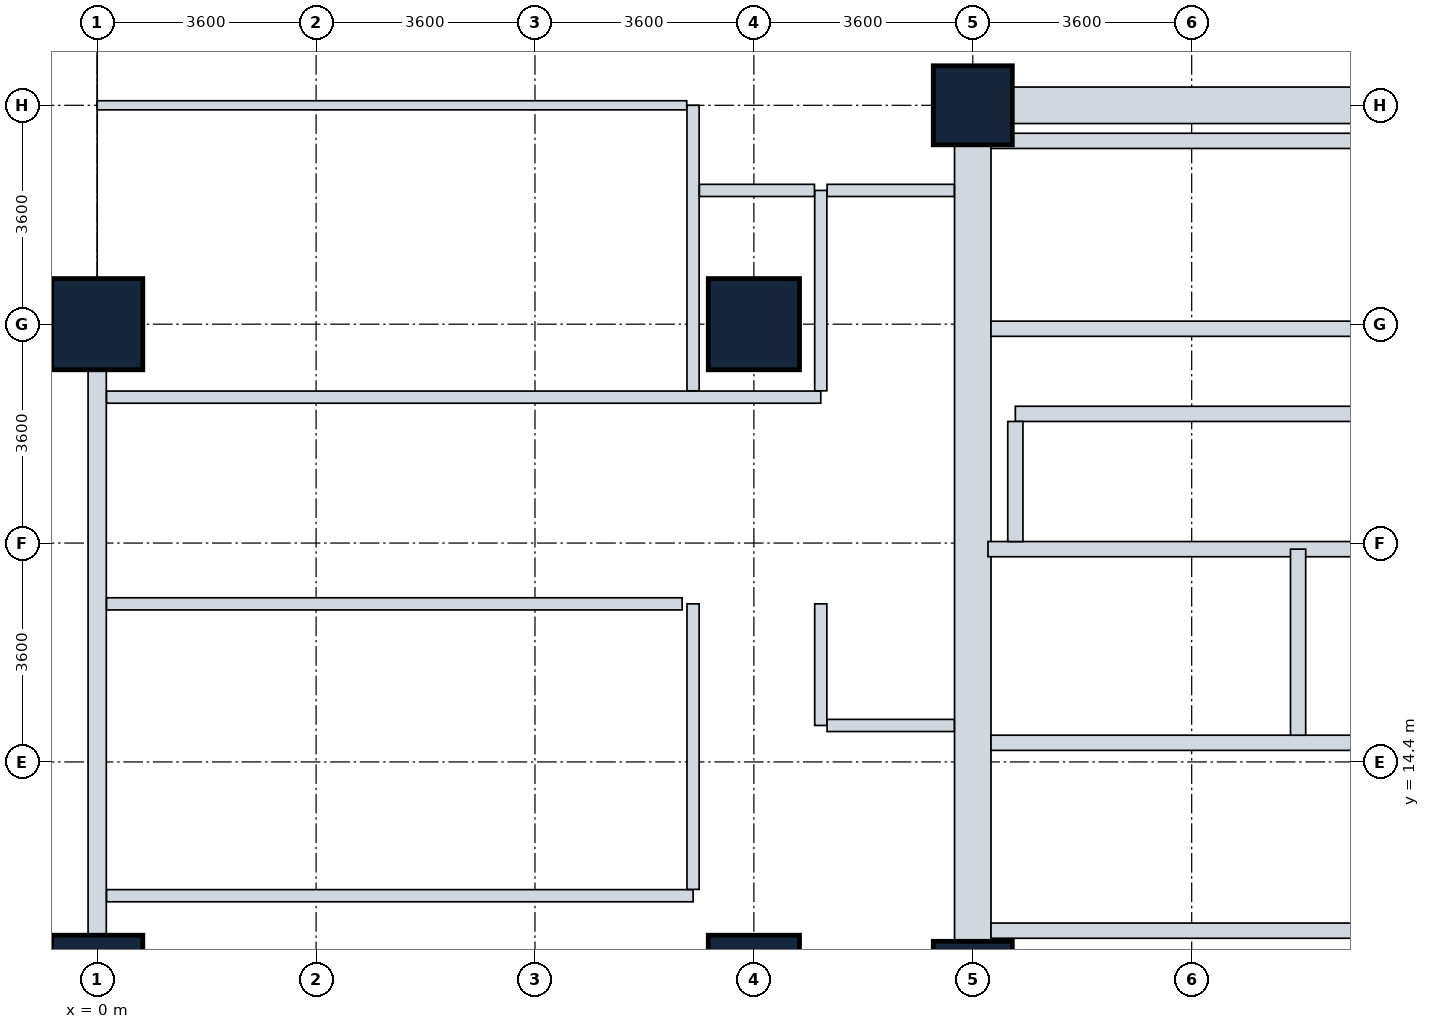
"""IFC4 building model, lengths in metres.
Left out: names, types, materials, properties, quantities, classifications, styles, units other than length and angle.
Written with IfcOpenShell. Run it as: python <this file> out.ifc"""

import sys

from ifc_helpers import new_model, si_unit, direction, frame, frame_2d, origin, origin_2d, place, context, subcontext, project, spatial, rectangle, extrude, element, fill, save


model = new_model("IFC4")
c1 = context("Model", 3, precision=1e-05, world=origin(), true_north=direction((0.0, 1.0)))
c2 = subcontext(c1, "Body", "Model", "MODEL_VIEW")
j1 = project(units=[si_unit("LENGTHUNIT", "METRE"), si_unit("PLANEANGLEUNIT", "RADIAN")], contexts=[c1])
p1 = place(None, origin())
s1 = spatial("IfcSite", under=j1, at=p1, CompositionType="ELEMENT")
p2 = place(p1, origin())
s2 = spatial("IfcBuilding", under=s1, at=p2, CompositionType="ELEMENT")
p3 = place(p2, origin())
s3 = spatial("IfcBuildingStorey", under=s2, at=p3, CompositionType="ELEMENT", Elevation=0.0)
for number, where, z_axis, x_axis in (
    (1, (0.0, 10.8, 0.0), (0.0, 0.0, 1.0), (1.0, 0.0, 0.0)),
    (2, (0.0, 21.6, 0.0), (0.0, 0.0, 1.0), (1.0, 0.0, 0.0)),
    (3, (10.8, 10.8, 0.0), (0.0, 0.0, 1.0), (1.0, 0.0, 0.0)),
    (4, (10.8, 21.6, 0.0), (0.0, 0.0, 1.0), (1.0, 0.0, 0.0)),
):
    element("IfcColumn", number, at=place(p3, frame(where, z_axis=z_axis, x_axis=x_axis)), inside=s3, PredefinedType="COLUMN", context=c2, shape_type="SweptSolid", body=[
        extrude(rectangle(XDim=1.5, YDim=1.5, at=origin_2d()), origin(), (0.0, 0.0, 1.0), 5.4),
    ])
for number, where, z_axis, x_axis in (
    (5, (14.4, 10.8, 0.0), (0.0, 0.0, 1.0), (1.0, 0.0, 0.0)),
    (6, (14.4, 25.2, 0.0), (0.0, 0.0, 1.0), (1.0, 0.0, 0.0)),
):
    element("IfcColumn", number, at=place(p3, frame(where, z_axis=z_axis, x_axis=x_axis)), inside=s3, PredefinedType="COLUMN", context=c2, shape_type="SweptSolid", body=[
        extrude(rectangle(XDim=1.3, YDim=1.3, at=origin_2d()), origin(), (0.0, 0.0, 1.0), 5.4),
    ])
p4 = place(p3, frame((0.0, 0.0, 0.0), z_axis=(0.0, 0.0, 1.0), x_axis=(0.0, 1.0, 0.0)))
e7 = element("IfcWall", 7, at=p4, inside=s3, PredefinedType="STANDARD", context=c2, shape_type="SweptSolid", body=[
    extrude(rectangle(XDim=21.6, YDim=0.3, at=frame_2d((10.8, 0.0))), origin(), (0.0, 0.0, 1.0), 4.43),
])
p5 = place(p4, frame((4.5, 0.0, 0.0)))
e8 = element("IfcOpeningElement", 8, at=p5, cuts=e7, PredefinedType="OPENING", context=c2, shape_type="SweptSolid", body=[
    extrude(rectangle(XDim=1.8, YDim=2.2, at=frame_2d((0.9, 1.1))), frame((0.0, 0.16, 0.0), z_axis=(0.0, -1.0, 0.0), x_axis=(1.0, 0.0, 0.0)), (0.0, 0.0, 1.0), 0.32),
])
p6 = place(p4, frame((13.6, 0.0, 0.0)))
e9 = element("IfcOpeningElement", 9, at=p6, cuts=e7, PredefinedType="OPENING", context=c2, shape_type="SweptSolid", body=[
    extrude(rectangle(XDim=1.1, YDim=2.2, at=frame_2d((0.55, 1.1))), frame((0.0, 0.16, 0.0), z_axis=(0.0, -1.0, 0.0), x_axis=(1.0, 0.0, 0.0)), (0.0, 0.0, 1.0), 0.32),
])
p7 = place(p4, frame((17.8, 0.0, 0.0)))
e10 = element("IfcOpeningElement", 10, at=p7, cuts=e7, PredefinedType="OPENING", context=c2, shape_type="SweptSolid", body=[
    extrude(rectangle(XDim=1.8, YDim=2.2, at=frame_2d((0.9, 1.1))), frame((0.0, 0.16, 0.0), z_axis=(0.0, -1.0, 0.0), x_axis=(1.0, 0.0, 0.0)), (0.0, 0.0, 1.0), 0.32),
])
p8 = place(p3, frame((14.4, 25.2, 0.0), z_axis=(0.0, 0.0, 1.0), x_axis=(1.0, 0.0, 0.0)))
e11 = element("IfcWall", 11, at=p8, inside=s3, PredefinedType="SHEAR", context=c2, shape_type="SweptSolid", body=[
    extrude(rectangle(XDim=18.0, YDim=0.6, at=frame_2d((9.0, 0.0))), origin(), (0.0, 0.0, 1.0), 5.1),
])
p9 = place(p3, frame((14.4, 10.8, 0.0), z_axis=(0.0, 0.0, 1.0), x_axis=(0.0, 1.0, 0.0)))
e12 = element("IfcWall", 12, at=p9, inside=s3, PredefinedType="SHEAR", context=c2, shape_type="SweptSolid", body=[
    extrude(rectangle(XDim=14.4, YDim=0.6, at=frame_2d((7.2, 0.0))), origin(), (0.0, 0.0, 1.0), 5.1),
])
p10 = place(p9, frame((11.05, 0.0, 0.0)))
e13 = element("IfcOpeningElement", 13, at=p10, cuts=e12, PredefinedType="OPENING", context=c2, shape_type="SweptSolid", body=[
    extrude(rectangle(XDim=1.1, YDim=2.1, at=frame_2d((0.55, 1.05))), frame((0.0, 0.31, 0.0), z_axis=(0.0, -1.0, 0.0), x_axis=(1.0, 0.0, 0.0)), (0.0, 0.0, 1.0), 0.62),
])
p11 = place(p9, frame((4.9, 0.0, 0.0)))
e14 = element("IfcOpeningElement", 14, at=p11, cuts=e12, PredefinedType="OPENING", context=c2, shape_type="SweptSolid", body=[
    extrude(rectangle(XDim=1.2, YDim=2.1, at=frame_2d((0.6, 1.05))), frame((0.0, 0.31, 0.0), z_axis=(0.0, -1.0, 0.0), x_axis=(1.0, 0.0, 0.0)), (0.0, 0.0, 1.0), 0.62),
])
p12 = place(p3, frame((14.7, 11.625, 0.0), z_axis=(0.0, 0.0, 1.0), x_axis=(1.0, 0.0, 0.0)))
e15 = element("IfcWall", 15, at=p12, inside=s3, PredefinedType="SHEAR", context=c2, shape_type="SweptSolid", body=[
    extrude(rectangle(XDim=8.65, YDim=0.25, at=frame_2d((4.325, 0.0))), origin(), (0.0, 0.0, 1.0), 5.1),
])
p13 = place(p3, frame((14.7, 14.715, 0.0), z_axis=(0.0, 0.0, 1.0), x_axis=(1.0, 0.0, 0.0)))
e16 = element("IfcWall", 16, at=p13, inside=s3, PredefinedType="SHEAR", context=c2, shape_type="SweptSolid", body=[
    extrude(rectangle(XDim=8.65, YDim=0.25, at=frame_2d((4.325, 0.0))), origin(), (0.0, 0.0, 1.0), 5.1),
])
p14 = place(p13, frame((0.655, 0.0, 0.0)))
e17 = element("IfcOpeningElement", 17, at=p14, cuts=e16, PredefinedType="OPENING", context=c2, shape_type="SweptSolid", body=[
    extrude(rectangle(XDim=1.1, YDim=2.1, at=frame_2d((0.55, 1.05))), frame((0.0, 0.135, 0.0), z_axis=(0.0, -1.0, 0.0), x_axis=(1.0, 0.0, 0.0)), (0.0, 0.0, 1.0), 0.27),
])
for number, where, z_axis, x_axis in (
    (18, (14.7, 21.525, 0.0), (0.0, 0.0, 1.0), (1.0, 0.0, 0.0)),
    (19, (14.7, 24.615, 0.0), (0.0, 0.0, 1.0), (1.0, 0.0, 0.0)),
):
    element("IfcWall", number, at=place(p3, frame(where, z_axis=z_axis, x_axis=x_axis)), inside=s3, PredefinedType="SHEAR", context=c2, shape_type="SweptSolid", body=[
        extrude(rectangle(XDim=8.2, YDim=0.25, at=frame_2d((4.1, 0.0))), origin(), (0.0, 0.0, 1.0), 5.1),
    ])
p15 = place(p3, frame((14.65, 17.9, 0.0), z_axis=(0.0, 0.0, 1.0), x_axis=(1.0, 0.0, 0.0)))
e20 = element("IfcWall", 20, at=p15, inside=s3, PredefinedType="PARTITIONING", context=c2, shape_type="SweptSolid", body=[
    extrude(rectangle(XDim=7.15, YDim=0.25, at=frame_2d((3.575, 0.0))), origin(), (0.0, 0.0, 1.0), 5.085),
])
p16 = place(p3, frame((19.75, 14.84, 0.0), z_axis=(0.0, 0.0, 1.0), x_axis=(0.0, 1.0, 0.0)))
e21 = element("IfcWall", 21, at=p16, inside=s3, PredefinedType="PARTITIONING", context=c2, shape_type="SweptSolid", body=[
    extrude(rectangle(XDim=3.06, YDim=0.25, at=frame_2d((1.53, 0.0))), origin(), (0.0, 0.0, 1.0), 5.085),
])
p17 = place(p16, frame((0.98, 0.0, 0.0)))
e22 = element("IfcOpeningElement", 22, at=p17, cuts=e21, PredefinedType="OPENING", context=c2, shape_type="SweptSolid", body=[
    extrude(rectangle(XDim=1.1, YDim=2.1, at=frame_2d((0.55, 1.05))), frame((0.0, 0.135, 0.0), z_axis=(0.0, -1.0, 0.0), x_axis=(1.0, 0.0, 0.0)), (0.0, 0.0, 1.0), 0.27),
])
p18 = place(p3, frame((15.1, 20.125, 0.0), z_axis=(0.0, 0.0, 1.0), x_axis=(1.0, 0.0, 0.0)))
e23 = element("IfcWall", 23, at=p18, inside=s3, PredefinedType="PARTITIONING", context=c2, shape_type="SweptSolid", body=[
    extrude(rectangle(XDim=7.55, YDim=0.25, at=frame_2d((3.775, 0.0))), origin(), (0.0, 0.0, 1.0), 5.085),
])
p19 = place(p18, frame((0.45, 0.0, 0.0)))
e24 = element("IfcOpeningElement", 24, at=p19, cuts=e23, PredefinedType="OPENING", context=c2, shape_type="SweptSolid", body=[
    extrude(rectangle(XDim=1.1, YDim=2.1, at=frame_2d((0.55, 1.05))), frame((0.0, 0.135, 0.0), z_axis=(0.0, -1.0, 0.0), x_axis=(1.0, 0.0, 0.0)), (0.0, 0.0, 1.0), 0.27),
])
p20 = place(p18, frame((2.3, 0.0, 0.0)))
e25 = element("IfcOpeningElement", 25, at=p20, cuts=e23, PredefinedType="OPENING", context=c2, shape_type="SweptSolid", body=[
    extrude(rectangle(XDim=1.1, YDim=2.1, at=frame_2d((0.55, 1.05))), frame((0.0, 0.135, 0.0), z_axis=(0.0, -1.0, 0.0), x_axis=(1.0, 0.0, 0.0)), (0.0, 0.0, 1.0), 0.27),
])
p21 = place(p18, frame((4.15, 0.0, 0.0)))
e26 = element("IfcOpeningElement", 26, at=p21, cuts=e23, PredefinedType="OPENING", context=c2, shape_type="SweptSolid", body=[
    extrude(rectangle(XDim=1.1, YDim=2.1, at=frame_2d((0.55, 1.05))), frame((0.0, 0.135, 0.0), z_axis=(0.0, -1.0, 0.0), x_axis=(1.0, 0.0, 0.0)), (0.0, 0.0, 1.0), 0.27),
])
p22 = place(p18, frame((6.0, 0.0, 0.0)))
e27 = element("IfcOpeningElement", 27, at=p22, cuts=e23, PredefinedType="OPENING", context=c2, shape_type="SweptSolid", body=[
    extrude(rectangle(XDim=1.1, YDim=2.1, at=frame_2d((0.55, 1.05))), frame((0.0, 0.135, 0.0), z_axis=(0.0, -1.0, 0.0), x_axis=(1.0, 0.0, 0.0)), (0.0, 0.0, 1.0), 0.27),
])
p23 = place(p3, frame((15.1, 18.025, 0.0), z_axis=(0.0, 0.0, 1.0), x_axis=(0.0, 1.0, 0.0)))
e28 = element("IfcWall", 28, at=p23, inside=s3, PredefinedType="PARTITIONING", context=c2, shape_type="SweptSolid", body=[
    extrude(rectangle(XDim=1.975, YDim=0.25, at=frame_2d((0.988, 0.0))), origin(), (0.0, 0.0, 1.0), 5.085),
])
p24 = place(p3, frame((0.154, 12.2, 0.0), z_axis=(0.0, 0.0, 1.0), x_axis=(1.0, 0.0, 0.0)))
e29 = element("IfcWall", 29, at=p24, inside=s3, PredefinedType="PARTITIONING", context=c2, shape_type="SweptSolid", body=[
    extrude(rectangle(XDim=9.646, YDim=0.2, at=frame_2d((4.823, 0.0))), origin(), (0.0, 0.0, 1.0), 4.63),
])
p25 = place(p24, frame((4.186, 0.0, 0.0)))
e30 = element("IfcOpeningElement", 30, at=p25, cuts=e29, PredefinedType="OPENING", context=c2, shape_type="SweptSolid", body=[
    extrude(rectangle(XDim=1.2, YDim=2.1, at=frame_2d((0.6, 1.05))), frame((0.0, 0.11, 0.0), z_axis=(0.0, -1.0, 0.0), x_axis=(1.0, 0.0, 0.0)), (0.0, 0.0, 1.0), 0.22),
])
p26 = place(p3, frame((9.8, 12.304, 0.0), z_axis=(0.0, 0.0, 1.0), x_axis=(0.0, 1.0, 0.0)))
e31 = element("IfcWall", 31, at=p26, inside=s3, PredefinedType="PARTITIONING", context=c2, shape_type="SweptSolid", body=[
    extrude(rectangle(XDim=4.696, YDim=0.2, at=frame_2d((2.348, 0.0))), origin(), (0.0, 0.0, 1.0), 5.085),
])
p27 = place(p3, frame((0.154, 17.0, 0.0), z_axis=(0.0, 0.0, 1.0), x_axis=(1.0, 0.0, 0.0)))
e32 = element("IfcWall", 32, at=p27, inside=s3, PredefinedType="PARTITIONING", context=c2, shape_type="SweptSolid", body=[
    extrude(rectangle(XDim=9.466, YDim=0.2, at=frame_2d((4.733, 0.0))), origin(), (0.0, 0.0, 1.0), 4.63),
])
p28 = place(p3, frame((11.9, 15.0, 0.0), z_axis=(0.0, 0.0, 1.0), x_axis=(0.0, 1.0, 0.0)))
e33 = element("IfcWall", 33, at=p28, inside=s3, PredefinedType="PARTITIONING", context=c2, shape_type="SweptSolid", body=[
    extrude(rectangle(XDim=2.0, YDim=0.2, at=frame_2d((1.0, 0.0))), origin(), (0.0, 0.0, 1.0), 5.085),
])
p29 = place(p3, frame((12.004, 15.0, 0.0), z_axis=(0.0, 0.0, 1.0), x_axis=(1.0, 0.0, 0.0)))
e34 = element("IfcWall", 34, at=p29, inside=s3, PredefinedType="PARTITIONING", context=c2, shape_type="SweptSolid", body=[
    extrude(rectangle(XDim=2.092, YDim=0.2, at=frame_2d((1.046, 0.0))), origin(), (0.0, 0.0, 1.0), 5.085),
])
p30 = place(p3, frame((0.154, 20.4, 0.0), z_axis=(0.0, 0.0, 1.0), x_axis=(1.0, 0.0, 0.0)))
e35 = element("IfcWall", 35, at=p30, inside=s3, PredefinedType="PARTITIONING", context=c2, shape_type="SweptSolid", body=[
    extrude(rectangle(XDim=11.746, YDim=0.2, at=frame_2d((5.873, 0.0))), origin(), (0.0, 0.0, 1.0), 4.43),
])
p31 = place(p3, frame((9.8, 20.504, 0.0), z_axis=(0.0, 0.0, 1.0), x_axis=(0.0, 1.0, 0.0)))
e36 = element("IfcWall", 36, at=p31, inside=s3, PredefinedType="PARTITIONING", context=c2, shape_type="SweptSolid", body=[
    extrude(rectangle(XDim=4.696, YDim=0.2, at=frame_2d((2.348, 0.0))), origin(), (0.0, 0.0, 1.0), 4.43),
])
p32 = place(p3, frame((11.9, 20.504, 0.0), z_axis=(0.0, 0.0, 1.0), x_axis=(0.0, 1.0, 0.0)))
e37 = element("IfcWall", 37, at=p32, inside=s3, PredefinedType="PARTITIONING", context=c2, shape_type="SweptSolid", body=[
    extrude(rectangle(XDim=3.296, YDim=0.2, at=frame_2d((1.648, 0.0))), origin(), (0.0, 0.0, 1.0), 5.085),
])
p33 = place(p3, frame((9.904, 23.8, 0.0), z_axis=(0.0, 0.0, 1.0), x_axis=(1.0, 0.0, 0.0)))
e38 = element("IfcWall", 38, at=p33, inside=s3, PredefinedType="PARTITIONING", context=c2, shape_type="SweptSolid", body=[
    extrude(rectangle(XDim=1.892, YDim=0.2, at=frame_2d((0.946, 0.0))), origin(), (0.0, 0.0, 1.0), 4.43),
])
p34 = place(p3, frame((12.004, 23.8, 0.0), z_axis=(0.0, 0.0, 1.0), x_axis=(1.0, 0.0, 0.0)))
e39 = element("IfcWall", 39, at=p34, inside=s3, PredefinedType="PARTITIONING", context=c2, shape_type="SweptSolid", body=[
    extrude(rectangle(XDim=2.092, YDim=0.2, at=frame_2d((1.046, 0.0))), origin(), (0.0, 0.0, 1.0), 5.085),
])
p35 = place(p3, frame((0.0, 25.2, 0.0), z_axis=(0.0, 0.0, 1.0), x_axis=(1.0, 0.0, 0.0)))
e40 = element("IfcWall", 40, at=p35, inside=s3, PredefinedType="PARTITIONING", context=c2, shape_type="SweptSolid", body=[
    extrude(rectangle(XDim=9.696, YDim=0.15, at=frame_2d((4.848, 0.0))), origin(), (0.0, 0.0, 1.0), 4.43),
])
p36 = place(p35, frame((4.44, 0.0, 0.0)))
e41 = element("IfcOpeningElement", 41, at=p36, cuts=e40, PredefinedType="OPENING", context=c2, shape_type="SweptSolid", body=[
    extrude(rectangle(XDim=1.0, YDim=2.1, at=frame_2d((0.5, 1.05))), frame((0.0, 0.085, 0.0), z_axis=(0.0, -1.0, 0.0), x_axis=(1.0, 0.0, 0.0)), (0.0, 0.0, 1.0), 0.17),
])
p37 = place(p6, origin())
e42 = element("IfcDoor", 42, at=p37, inside=s3, OperationType="SINGLE_SWING_LEFT", PredefinedType="DOOR", context=c2, shape_type="SweptSolid", body=[
    extrude(rectangle(XDim=1.1, YDim=2.2, at=frame_2d((0.55, 1.1))), frame((0.0, 0.025, 0.0), z_axis=(0.0, -1.0, 0.0), x_axis=(1.0, 0.0, 0.0)), (0.0, 0.0, 1.0), 0.05),
])
fill(e9, e42)
p38 = place(p7, origin())
e43 = element("IfcDoor", 43, at=p38, inside=s3, OperationType="SINGLE_SWING_LEFT", PredefinedType="DOOR", context=c2, shape_type="SweptSolid", body=[
    extrude(rectangle(XDim=1.8, YDim=2.2, at=frame_2d((0.9, 1.1))), frame((0.0, 0.025, 0.0), z_axis=(0.0, -1.0, 0.0), x_axis=(1.0, 0.0, 0.0)), (0.0, 0.0, 1.0), 0.05),
])
fill(e10, e43)
p39 = place(p14, origin())
e44 = element("IfcDoor", 44, at=p39, inside=s3, OperationType="SINGLE_SWING_LEFT", PredefinedType="DOOR", context=c2, shape_type="SweptSolid", body=[
    extrude(rectangle(XDim=1.1, YDim=2.1, at=frame_2d((0.55, 1.05))), frame((0.0, 0.025, 0.0), z_axis=(0.0, -1.0, 0.0), x_axis=(1.0, 0.0, 0.0)), (0.0, 0.0, 1.0), 0.05),
])
fill(e17, e44)
p40 = place(p10, origin())
e45 = element("IfcDoor", 45, at=p40, inside=s3, OperationType="SINGLE_SWING_RIGHT", PredefinedType="DOOR", context=c2, shape_type="SweptSolid", body=[
    extrude(rectangle(XDim=1.1, YDim=2.1, at=frame_2d((0.55, 1.05))), frame((0.0, 0.025, 0.0), z_axis=(0.0, -1.0, 0.0), x_axis=(1.0, 0.0, 0.0)), (0.0, 0.0, 1.0), 0.05),
])
fill(e13, e45)
p41 = place(p17, origin())
e46 = element("IfcDoor", 46, at=p41, inside=s3, OperationType="SLIDING_TO_LEFT", PredefinedType="DOOR", context=c2, shape_type="SweptSolid", body=[
    extrude(rectangle(XDim=1.1, YDim=2.1, at=frame_2d((0.55, 1.05))), frame((0.0, 0.025, 0.0), z_axis=(0.0, -1.0, 0.0), x_axis=(1.0, 0.0, 0.0)), (0.0, 0.0, 1.0), 0.05),
])
fill(e22, e46)
p42 = place(p11, origin())
e47 = element("IfcDoor", 47, at=p42, inside=s3, OperationType="SINGLE_SWING_RIGHT", PredefinedType="DOOR", context=c2, shape_type="SweptSolid", body=[
    extrude(rectangle(XDim=1.2, YDim=2.1, at=frame_2d((0.6, 1.05))), frame((0.0, 0.025, 0.0), z_axis=(0.0, -1.0, 0.0), x_axis=(1.0, 0.0, 0.0)), (0.0, 0.0, 1.0), 0.05),
])
fill(e14, e47)
p43 = place(p19, origin())
e48 = element("IfcDoor", 48, at=p43, inside=s3, OperationType="SLIDING_TO_LEFT", PredefinedType="DOOR", context=c2, shape_type="SweptSolid", body=[
    extrude(rectangle(XDim=1.1, YDim=2.1, at=frame_2d((0.55, 1.05))), frame((0.0, 0.025, 0.0), z_axis=(0.0, -1.0, 0.0), x_axis=(1.0, 0.0, 0.0)), (0.0, 0.0, 1.0), 0.05),
])
fill(e24, e48)
p44 = place(p20, origin())
e49 = element("IfcDoor", 49, at=p44, inside=s3, OperationType="SLIDING_TO_LEFT", PredefinedType="DOOR", context=c2, shape_type="SweptSolid", body=[
    extrude(rectangle(XDim=1.1, YDim=2.1, at=frame_2d((0.55, 1.05))), frame((0.0, 0.025, 0.0), z_axis=(0.0, -1.0, 0.0), x_axis=(1.0, 0.0, 0.0)), (0.0, 0.0, 1.0), 0.05),
])
fill(e25, e49)
p45 = place(p21, origin())
e50 = element("IfcDoor", 50, at=p45, inside=s3, OperationType="SLIDING_TO_LEFT", PredefinedType="DOOR", context=c2, shape_type="SweptSolid", body=[
    extrude(rectangle(XDim=1.1, YDim=2.1, at=frame_2d((0.55, 1.05))), frame((0.0, 0.025, 0.0), z_axis=(0.0, -1.0, 0.0), x_axis=(1.0, 0.0, 0.0)), (0.0, 0.0, 1.0), 0.05),
])
fill(e26, e50)
p46 = place(p25, origin())
e51 = element("IfcDoor", 51, at=p46, inside=s3, OperationType="SINGLE_SWING_RIGHT", PredefinedType="DOOR", context=c2, shape_type="SweptSolid", body=[
    extrude(rectangle(XDim=1.2, YDim=2.1, at=frame_2d((0.6, 1.05))), frame((0.0, 0.025, 0.0), z_axis=(0.0, -1.0, 0.0), x_axis=(1.0, 0.0, 0.0)), (0.0, 0.0, 1.0), 0.05),
])
fill(e30, e51)
p47 = place(p36, origin())
e52 = element("IfcDoor", 52, at=p47, inside=s3, OperationType="SINGLE_SWING_LEFT", PredefinedType="DOOR", context=c2, shape_type="SweptSolid", body=[
    extrude(rectangle(XDim=1.0, YDim=2.1, at=frame_2d((0.5, 1.05))), frame((0.0, 0.025, 0.0), z_axis=(0.0, -1.0, 0.0), x_axis=(1.0, 0.0, 0.0)), (0.0, 0.0, 1.0), 0.05),
])
fill(e41, e52)
save(model, sys.argv[1])
